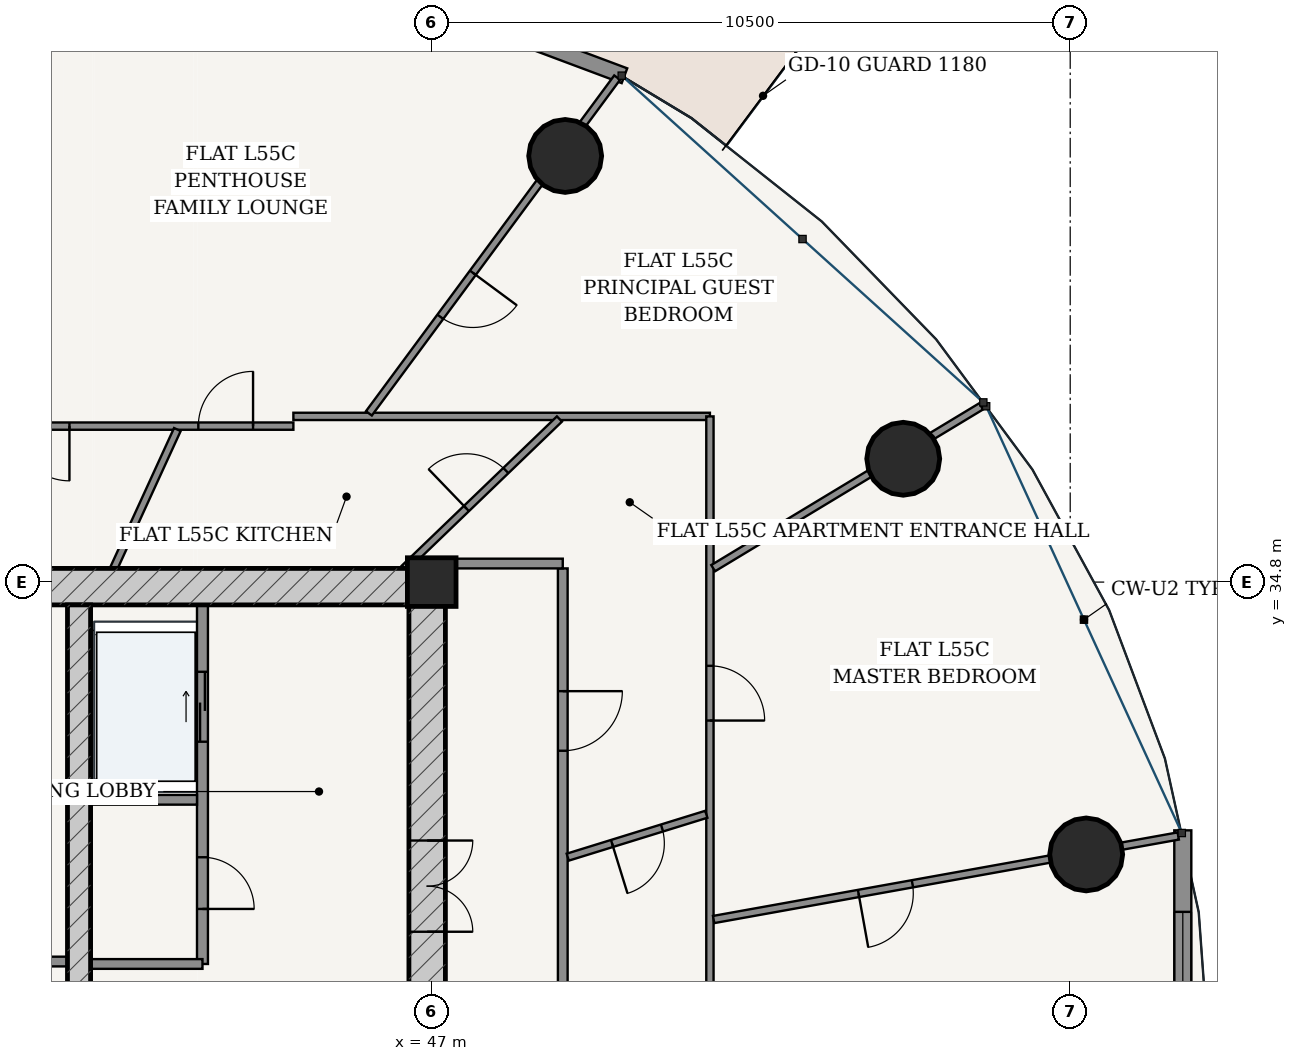
"""IFC4 building model, lengths in metres.
Left out: names, types, materials, properties, quantities, classifications, styles, units other than length and angle.
Written with IfcOpenShell. Run it as: python <this file> out.ifc"""

import sys

from ifc_helpers import new_model, si_unit, direction, frame, frame_2d, origin, origin_2d, place, context, subcontext, project, spatial, rectangle, hollow_circle, extrude, source, transform, mapped, element, fill, save


model = new_model("IFC4")
c1 = context("Model", 3, precision=1e-05, world=origin(), true_north=direction((-0.2419218956, 0.970295726276)))
c2 = subcontext(c1, "Body", "Model", "MODEL_VIEW")
j1 = project(units=[si_unit("LENGTHUNIT", "METRE"), si_unit("PLANEANGLEUNIT", "RADIAN")], contexts=[c1])
p1 = place(None, origin())
s1 = spatial("IfcSite", under=j1, at=p1, CompositionType="ELEMENT")
p2 = place(p1, origin())
s2 = spatial("IfcBuilding", under=s1, at=p2, CompositionType="ELEMENT")
p3 = place(p2, frame((0.0, 0.0, 209.7)))
s3 = spatial("IfcBuildingStorey", under=s2, at=p3, CompositionType="ELEMENT", Elevation=209.7)
p4 = place(p3, frame((47.0, 34.8, 0.0), z_axis=(0.0, 0.0, 1.0), x_axis=(1.0, 0.0, 0.0)))
e1 = element("IfcColumn", 1, at=p4, inside=s3, PredefinedType="COLUMN", context=c2, shape_type="SweptSolid", body=[
    extrude(rectangle(XDim=0.8, YDim=0.8, at=origin_2d()), origin(), (0.0, 0.0, 1.0), 3.7),
])
p5 = place(p3, frame((28.775, 34.725, 0.0), z_axis=(0.0, 0.0, 1.0), x_axis=(1.0, 0.0, 0.0)))
e2 = element("IfcWall", 2, at=p5, inside=s3, PredefinedType="SHEAR", context=c2, shape_type="SweptSolid", body=[
    extrude(rectangle(XDim=18.45, YDim=0.6, at=frame_2d((9.225, 0.0))), origin(), (0.0, 0.0, 1.0), 3.435),
])
p6 = place(p3, frame((46.925, 19.175, 0.0), z_axis=(0.0, 0.0, 1.0), x_axis=(0.0, 1.0, 0.0)))
e3 = element("IfcWall", 3, at=p6, inside=s3, PredefinedType="SHEAR", context=c2, shape_type="SweptSolid", body=[
    extrude(rectangle(XDim=15.25, YDim=0.6, at=frame_2d((7.625, 0.0))), origin(), (0.0, 0.0, 1.0), 3.435),
])
p7 = place(p6, frame((9.875, 0.0, 0.0)))
e4 = element("IfcOpeningElement", 4, at=p7, cuts=e3, PredefinedType="OPENING", context=c2, shape_type="SweptSolid", body=[
    extrude(rectangle(XDim=1.5, YDim=2.2, at=frame_2d((0.75, 1.1))), frame((0.0, 0.31, 0.0), z_axis=(0.0, -1.0, 0.0), x_axis=(1.0, 0.0, 0.0)), (0.0, 0.0, 1.0), 0.62),
])
p8 = place(p3, frame((41.2, 19.175, 0.0), z_axis=(0.0, 0.0, 1.0), x_axis=(0.0, 1.0, 0.0)))
e5 = element("IfcWall", 5, at=p8, inside=s3, PredefinedType="SHEAR", context=c2, shape_type="SweptSolid", body=[
    extrude(rectangle(XDim=15.25, YDim=0.38, at=frame_2d((7.625, 0.0))), origin(), (0.0, 0.0, 1.0), 3.435),
])
p9 = place(p8, frame((7.8, 0.0, 0.0)))
e6 = element("IfcOpeningElement", 6, at=p9, cuts=e5, PredefinedType="OPENING", context=c2, shape_type="SweptSolid", body=[
    extrude(rectangle(XDim=1.05, YDim=2.15, at=frame_2d((0.525, 1.075))), frame((0.0, 0.2, 0.0), z_axis=(0.0, -1.0, 0.0), x_axis=(1.0, 0.0, 0.0)), (0.0, 0.0, 1.0), 0.4),
])
for number, where, z_axis, x_axis in (
    (7, (57.763, 30.321, 0.0), (0.0, 0.0, 1.0), (1.0, 0.0, 0.0)),
    (8, (54.754, 36.828, 0.0), (0.0, 0.0, 1.0), (1.0, 0.0, 0.0)),
    (9, (49.195, 41.808, 0.0), (0.0, 0.0, 1.0), (1.0, 0.0, 0.0)),
):
    element("IfcColumn", number, at=place(p3, frame(where, z_axis=z_axis, x_axis=x_axis)), inside=s3, PredefinedType="COLUMN", context=c2, shape_type="SweptSolid", body=[
        extrude(hollow_circle(Radius=0.6, WallThickness=0.038, at=origin_2d()), origin(), (0.0, 0.0, 1.0), 3.7),
    ])
p10 = place(p3, frame((50.17, 43.127, 0.0), z_axis=(0.0, 0.0, 1.0), x_axis=(-0.936556918375, 0.350515532672, 0.0)))
e10 = element("IfcWall", 10, at=p10, inside=s3, PredefinedType="SOLIDWALL", context=c2, shape_type="SweptSolid", body=[
    extrude(rectangle(XDim=8.539, YDim=0.26, at=frame_2d((4.27, 0.0))), origin(), (0.0, 0.0, 1.0), 3.435),
])
p11 = place(p10, frame((3.594, 0.0, 0.0)))
e11 = element("IfcOpeningElement", 11, at=p11, cuts=e10, PredefinedType="OPENING", context=c2, shape_type="SweptSolid", body=[
    extrude(rectangle(XDim=1.35, YDim=2.2, at=frame_2d((0.675, 1.1))), frame((0.0, 0.14, 0.0), z_axis=(0.0, -1.0, 0.0), x_axis=(1.0, 0.0, 0.0)), (0.0, 0.0, 1.0), 0.28),
])
p12 = place(p3, frame((59.352, 22.883, 0.0), z_axis=(0.0, 0.0, 1.0), x_axis=(0.0, 1.0, 0.0)))
e12 = element("IfcWall", 12, at=p12, inside=s3, PredefinedType="SOLIDWALL", context=c2, shape_type="SweptSolid", body=[
    extrude(rectangle(XDim=7.835, YDim=0.28, at=frame_2d((3.917, 0.0))), origin(), (0.0, 0.0, 1.0), 3.435),
])
p13 = place(p12, frame((1.34, 0.0, 0.85)))
e13 = element("IfcOpeningElement", 13, at=p13, cuts=e12, PredefinedType="OPENING", context=c2, shape_type="SweptSolid", body=[
    extrude(rectangle(XDim=1.55, YDim=1.95, at=frame_2d((0.775, 0.975))), frame((0.0, 0.15, 0.0), z_axis=(0.0, -1.0, 0.0), x_axis=(1.0, 0.0, 0.0)), (0.0, 0.0, 1.0), 0.3),
])
p14 = place(p12, frame((4.944, 0.0, 0.85)))
e14 = element("IfcOpeningElement", 14, at=p14, cuts=e12, PredefinedType="OPENING", context=c2, shape_type="SweptSolid", body=[
    extrude(rectangle(XDim=1.55, YDim=1.95, at=frame_2d((0.775, 0.975))), frame((0.0, 0.15, 0.0), z_axis=(0.0, -1.0, 0.0), x_axis=(1.0, 0.0, 0.0)), (0.0, 0.0, 1.0), 0.3),
])
p15 = place(p3, frame((43.23, 28.52, 0.0), z_axis=(0.0, 0.0, 1.0), x_axis=(0.0, 1.0, 0.0)))
e15 = element("IfcWall", 15, at=p15, inside=s3, PredefinedType="PARTITIONING", context=c2, shape_type="SweptSolid", body=[
    extrude(rectangle(XDim=5.905, YDim=0.18, at=frame_2d((2.953, 0.0))), origin(), (0.0, 0.0, 1.0), 3.435),
])
p16 = place(p15, frame((0.905, 0.0, 0.0)))
e16 = element("IfcOpeningElement", 16, at=p16, cuts=e15, PredefinedType="OPENING", context=c2, shape_type="SweptSolid", body=[
    extrude(rectangle(XDim=0.85, YDim=2.1, at=frame_2d((0.425, 1.05))), frame((0.0, 0.1, 0.0), z_axis=(0.0, -1.0, 0.0), x_axis=(1.0, 0.0, 0.0)), (0.0, 0.0, 1.0), 0.2),
])
p17 = place(p15, frame((3.655, 0.0, 0.0)))
e17 = element("IfcOpeningElement", 17, at=p17, cuts=e15, PredefinedType="OPENING", context=c2, shape_type="SweptSolid", body=[
    extrude(rectangle(XDim=1.15, YDim=2.2, at=frame_2d((0.575, 1.1))), frame((0.0, 0.1, 0.0), z_axis=(0.0, -1.0, 0.0), x_axis=(1.0, 0.0, 0.0)), (0.0, 0.0, 1.0), 0.2),
])
p18 = place(p3, frame((41.39, 31.22, 0.0), z_axis=(0.0, 0.0, 1.0), x_axis=(1.0, 0.0, 0.0)))
e18 = element("IfcWall", 18, at=p18, inside=s3, PredefinedType="PARTITIONING", context=c2, shape_type="SweptSolid", body=[
    extrude(rectangle(XDim=1.75, YDim=0.16, at=frame_2d((0.875, 0.0))), origin(), (0.0, 0.0, 1.0), 3.435),
])
p19 = place(p3, frame((41.39, 28.52, 0.0), z_axis=(0.0, 0.0, 1.0), x_axis=(1.0, 0.0, 0.0)))
e19 = element("IfcWall", 19, at=p19, inside=s3, PredefinedType="PARTITIONING", context=c2, shape_type="SweptSolid", body=[
    extrude(rectangle(XDim=1.84, YDim=0.16, at=frame_2d((0.92, 0.0))), origin(), (0.0, 0.0, 1.0), 3.435),
])
p20 = place(p3, frame((34.99, 28.56, 0.0), z_axis=(0.0, 0.0, 1.0), x_axis=(1.0, 0.0, 0.0)))
e20 = element("IfcWall", 20, at=p20, inside=s3, PredefinedType="PARTITIONING", context=c2, shape_type="SweptSolid", body=[
    extrude(rectangle(XDim=6.02, YDim=0.16, at=frame_2d((3.01, 0.0))), origin(), (0.0, 0.0, 1.0), 3.435),
])
p21 = place(p20, frame((1.025, 0.0, 0.0)))
e21 = element("IfcOpeningElement", 21, at=p21, cuts=e20, PredefinedType="OPENING", context=c2, shape_type="SweptSolid", body=[
    extrude(rectangle(XDim=0.86, YDim=2.1, at=frame_2d((0.43, 1.05))), frame((0.0, 0.09, 0.0), z_axis=(0.0, -1.0, 0.0), x_axis=(1.0, 0.0, 0.0)), (0.0, 0.0, 1.0), 0.18),
])
p22 = place(p20, frame((4.14, 0.0, 0.0)))
e22 = element("IfcOpeningElement", 22, at=p22, cuts=e20, PredefinedType="OPENING", context=c2, shape_type="SweptSolid", body=[
    extrude(rectangle(XDim=0.85, YDim=2.1, at=frame_2d((0.425, 1.05))), frame((0.0, 0.09, 0.0), z_axis=(0.0, -1.0, 0.0), x_axis=(1.0, 0.0, 0.0)), (0.0, 0.0, 1.0), 0.18),
])
p23 = place(p3, frame((49.155, 16.725, 0.0), z_axis=(0.0, 0.0, 1.0), x_axis=(0.0, 1.0, 0.0)))
e23 = element("IfcWall", 23, at=p23, inside=s3, PredefinedType="PARTITIONING", context=c2, shape_type="SweptSolid", body=[
    extrude(rectangle(XDim=18.3, YDim=0.16, at=frame_2d((9.15, 0.0))), origin(), (0.0, 0.0, 1.0), 2.951),
])
p24 = place(p23, frame((15.302, 0.0, 0.0)))
e24 = element("IfcOpeningElement", 24, at=p24, cuts=e23, PredefinedType="OPENING", context=c2, shape_type="SweptSolid", body=[
    extrude(rectangle(XDim=0.98, YDim=2.2, at=frame_2d((0.49, 1.1))), frame((0.0, 0.09, 0.0), z_axis=(0.0, -1.0, 0.0), x_axis=(1.0, 0.0, 0.0)), (0.0, 0.0, 1.0), 0.18),
])
p25 = place(p3, frame((47.225, 35.105, 0.0), z_axis=(0.0, 0.0, 1.0), x_axis=(1.0, 0.0, 0.0)))
e25 = element("IfcWall", 25, at=p25, inside=s3, PredefinedType="PARTITIONING", context=c2, shape_type="SweptSolid", body=[
    extrude(rectangle(XDim=1.93, YDim=0.16, at=frame_2d((0.965, 0.0))), origin(), (0.0, 0.0, 1.0), 3.435),
])
p26 = place(p3, frame((38.102, 37.365, 0.0), z_axis=(0.0, 0.0, 1.0), x_axis=(1.0, 0.0, 0.0)))
e26 = element("IfcWall", 26, at=p26, inside=s3, PredefinedType="PARTITIONING", context=c2, shape_type="SweptSolid", body=[
    extrude(rectangle(XDim=6.623, YDim=0.12, at=frame_2d((3.312, 0.0))), origin(), (0.0, 0.0, 1.0), 2.951),
])
p27 = place(p26, frame((5.06, 0.0, 0.0)))
e27 = element("IfcOpeningElement", 27, at=p27, cuts=e26, PredefinedType="OPENING", context=c2, shape_type="SweptSolid", body=[
    extrude(rectangle(XDim=0.9, YDim=2.15, at=frame_2d((0.45, 1.075))), frame((0.0, 0.07, 0.0), z_axis=(0.0, -1.0, 0.0), x_axis=(1.0, 0.0, 0.0)), (0.0, 0.0, 1.0), 0.14),
])
p28 = place(p26, frame((2.04, 0.0, 0.0)))
e28 = element("IfcOpeningElement", 28, at=p28, cuts=e26, PredefinedType="OPENING", context=c2, shape_type="SweptSolid", body=[
    extrude(rectangle(XDim=0.9, YDim=2.15, at=frame_2d((0.45, 1.075))), frame((0.0, 0.07, 0.0), z_axis=(0.0, -1.0, 0.0), x_axis=(1.0, 0.0, 0.0)), (0.0, 0.0, 1.0), 0.14),
])
p29 = place(p3, frame((44.725, 37.525, 0.0), z_axis=(0.0, 0.0, 1.0), x_axis=(1.0, 0.0, 0.0)))
e29 = element("IfcWall", 29, at=p29, inside=s3, PredefinedType="PARTITIONING", context=c2, shape_type="SweptSolid", body=[
    extrude(rectangle(XDim=6.85, YDim=0.12, at=frame_2d((3.425, 0.0))), origin(), (0.0, 0.0, 1.0), 2.951),
])
p30 = place(p3, frame((51.575, 37.525, 0.0), z_axis=(0.0, 0.0, 1.0), x_axis=(0.0, -1.0, 0.0)))
e30 = element("IfcWall", 30, at=p30, inside=s3, PredefinedType="PARTITIONING", context=c2, shape_type="SweptSolid", body=[
    extrude(rectangle(XDim=22.89, YDim=0.12, at=frame_2d((11.445, 0.0))), origin(), (0.0, 0.0, 1.0), 2.951),
])
p31 = place(p30, frame((4.102, 0.0, 0.0)))
e31 = element("IfcOpeningElement", 31, at=p31, cuts=e30, PredefinedType="OPENING", context=c2, shape_type="SweptSolid", body=[
    extrude(rectangle(XDim=0.9, YDim=2.15, at=frame_2d((0.45, 1.075))), frame((0.0, 0.07, 0.0), z_axis=(0.0, -1.0, 0.0), x_axis=(1.0, 0.0, 0.0)), (0.0, 0.0, 1.0), 0.14),
])
p32 = place(p30, frame((19.163, 0.0, 0.0)))
e32 = element("IfcOpeningElement", 32, at=p32, cuts=e30, PredefinedType="OPENING", context=c2, shape_type="SweptSolid", body=[
    extrude(rectangle(XDim=0.86, YDim=2.15, at=frame_2d((0.43, 1.075))), frame((0.0, 0.07, 0.0), z_axis=(0.0, -1.0, 0.0), x_axis=(1.0, 0.0, 0.0)), (0.0, 0.0, 1.0), 0.14),
])
p33 = place(p30, frame((13.046, 0.0, 0.0)))
e33 = element("IfcOpeningElement", 33, at=p33, cuts=e30, PredefinedType="OPENING", context=c2, shape_type="SweptSolid", body=[
    extrude(rectangle(XDim=0.9, YDim=2.15, at=frame_2d((0.45, 1.075))), frame((0.0, 0.07, 0.0), z_axis=(0.0, -1.0, 0.0), x_axis=(1.0, 0.0, 0.0)), (0.0, 0.0, 1.0), 0.14),
])
p34 = place(p3, frame((51.636, 29.251, 0.0), z_axis=(0.0, 0.0, 1.0), x_axis=(0.984223216243, 0.176931231294, 0.0)))
e34 = element("IfcWall", 34, at=p34, inside=s3, PredefinedType="PARTITIONING", context=c2, shape_type="SweptSolid", body=[
    extrude(rectangle(XDim=7.763, YDim=0.12, at=frame_2d((3.882, 0.0))), origin(), (0.0, 0.0, 1.0), 2.951),
])
p35 = place(p34, frame((2.421, 0.0, 0.0)))
e35 = element("IfcOpeningElement", 35, at=p35, cuts=e34, PredefinedType="OPENING", context=c2, shape_type="SweptSolid", body=[
    extrude(rectangle(XDim=0.9, YDim=2.15, at=frame_2d((0.45, 1.075))), frame((0.0, 0.07, 0.0), z_axis=(0.0, -1.0, 0.0), x_axis=(1.0, 0.0, 0.0)), (0.0, 0.0, 1.0), 0.14),
])
p36 = place(p3, frame((51.628, 35.029, 0.0), z_axis=(0.0, 0.0, 1.0), x_axis=(0.856041879651, 0.516906471505, 0.0)))
e36 = element("IfcWall", 36, at=p36, inside=s3, PredefinedType="PARTITIONING", context=c2, shape_type="SweptSolid", body=[
    extrude(rectangle(XDim=5.149, YDim=0.12, at=frame_2d((2.574, 0.0))), origin(), (0.0, 0.0, 1.0), 2.951),
])
p37 = place(p3, frame((45.967, 37.575, 0.0), z_axis=(0.0, 0.0, 1.0), x_axis=(0.59452500855, 0.804077119565, 0.0)))
e37 = element("IfcWall", 37, at=p37, inside=s3, PredefinedType="PARTITIONING", context=c2, shape_type="SweptSolid", body=[
    extrude(rectangle(XDim=6.867, YDim=0.12, at=frame_2d((3.434, 0.0))), origin(), (0.0, 0.0, 1.0), 2.951),
])
p38 = place(p37, frame((1.975, 0.0, 0.0)))
e38 = element("IfcOpeningElement", 38, at=p38, cuts=e37, PredefinedType="OPENING", context=c2, shape_type="SweptSolid", body=[
    extrude(rectangle(XDim=0.9, YDim=2.15, at=frame_2d((0.45, 1.075))), frame((0.0, 0.07, 0.0), z_axis=(0.0, -1.0, 0.0), x_axis=(1.0, 0.0, 0.0)), (0.0, 0.0, 1.0), 0.14),
])
p39 = place(p3, frame((49.237, 30.277, 0.0), z_axis=(0.0, 0.0, 1.0), x_axis=(0.955326488692, 0.295552533406, 0.0)))
e39 = element("IfcWall", 39, at=p39, inside=s3, PredefinedType="PARTITIONING", context=c2, shape_type="SweptSolid", body=[
    extrude(rectangle(XDim=2.386, YDim=0.12, at=frame_2d((1.193, 0.0))), origin(), (0.0, 0.0, 1.0), 3.435),
])
p40 = place(p39, frame((0.763, 0.0, 0.0)))
e40 = element("IfcOpeningElement", 40, at=p40, cuts=e39, PredefinedType="OPENING", context=c2, shape_type="SweptSolid", body=[
    extrude(rectangle(XDim=0.86, YDim=2.15, at=frame_2d((0.43, 1.075))), frame((0.0, 0.07, 0.0), z_axis=(0.0, -1.0, 0.0), x_axis=(1.0, 0.0, 0.0)), (0.0, 0.0, 1.0), 0.14),
])
p41 = place(p3, frame((46.549, 35.026, 0.0), z_axis=(0.0, 0.0, 1.0), x_axis=(0.720557461206, 0.693395230082, 0.0)))
e41 = element("IfcWall", 41, at=p41, inside=s3, PredefinedType="PARTITIONING", context=c2, shape_type="SweptSolid", body=[
    extrude(rectangle(XDim=3.541, YDim=0.12, at=frame_2d((1.771, 0.0))), origin(), (0.0, 0.0, 1.0), 2.951),
])
p42 = place(p41, frame((1.419, 0.0, 0.0)))
e42 = element("IfcOpeningElement", 42, at=p42, cuts=e41, PredefinedType="OPENING", context=c2, shape_type="SweptSolid", body=[
    extrude(rectangle(XDim=0.9, YDim=2.15, at=frame_2d((0.45, 1.075))), frame((0.0, 0.07, 0.0), z_axis=(0.0, -1.0, 0.0), x_axis=(1.0, 0.0, 0.0)), (0.0, 0.0, 1.0), 0.14),
])
p43 = place(p3, frame((41.771, 35.027, 0.0), z_axis=(0.0, 0.0, 1.0), x_axis=(0.416688202143, 0.909049471808, 0.0)))
e43 = element("IfcWall", 43, at=p43, inside=s3, PredefinedType="PARTITIONING", context=c2, shape_type="SweptSolid", body=[
    extrude(rectangle(XDim=2.51, YDim=0.12, at=frame_2d((1.255, 0.0))), origin(), (0.0, 0.0, 1.0), 3.435),
])
m1 = source(origin(), c2, "Body", "SweptSolid", [
    extrude(rectangle(XDim=1.55, YDim=1.95, at=frame_2d((0.775, 0.975))), frame((0.0, 0.03, 0.0), z_axis=(0.0, -1.0, 0.0), x_axis=(1.0, 0.0, 0.0)), (0.0, 0.0, 1.0), 0.06),
])
p44 = place(p14, origin())
e44 = element("IfcWindow", 44, at=p44, inside=s3, PartitioningType="SINGLE_PANEL", PredefinedType="WINDOW", context=c2, shape_type="MappedRepresentation", body=[
    mapped(m1, transform((0.0, 0.0, 0.0), scale=1.0)),
])
fill(e14, e44)
m2 = source(origin(), c2, "Body", "SweptSolid", [
    extrude(rectangle(XDim=1.5, YDim=2.2, at=frame_2d((0.75, 1.1))), frame((0.0, 0.025, 0.0), z_axis=(0.0, -1.0, 0.0), x_axis=(1.0, 0.0, 0.0)), (0.0, 0.0, 1.0), 0.05),
])
p45 = place(p7, frame((1.5, 0.0, 0.0), z_axis=(0.0, 0.0, 1.0), x_axis=(-1.0, 0.0, 0.0)))
e45 = element("IfcDoor", 45, at=p45, inside=s3, OperationType="DOUBLE_DOOR_SINGLE_SWING", PredefinedType="DOOR", context=c2, shape_type="MappedRepresentation", body=[
    mapped(m2, transform((0.0, 0.0, 0.0), scale=1.0)),
])
fill(e4, e45)
m3 = source(origin(), c2, "Body", "SweptSolid", [
    extrude(rectangle(XDim=0.85, YDim=2.1, at=frame_2d((0.425, 1.05))), frame((0.0, 0.025, 0.0), z_axis=(0.0, -1.0, 0.0), x_axis=(1.0, 0.0, 0.0)), (0.0, 0.0, 1.0), 0.05),
])
p46 = place(p16, frame((0.85, 0.0, 0.0), z_axis=(0.0, 0.0, 1.0), x_axis=(-1.0, 0.0, 0.0)))
e46 = element("IfcDoor", 46, at=p46, inside=s3, OperationType="SINGLE_SWING_RIGHT", PredefinedType="DOOR", context=c2, shape_type="MappedRepresentation", body=[
    mapped(m3, transform((0.0, 0.0, 0.0), scale=1.0)),
])
fill(e16, e46)
m4 = source(origin(), c2, "Body", "SweptSolid", [
    extrude(rectangle(XDim=1.15, YDim=2.2, at=frame_2d((0.575, 1.1))), frame((0.0, 0.025, 0.0), z_axis=(0.0, -1.0, 0.0), x_axis=(1.0, 0.0, 0.0)), (0.0, 0.0, 1.0), 0.05),
])
p47 = place(p17, origin())
e47 = element("IfcDoor", 47, at=p47, inside=s3, OperationType="DOUBLE_DOOR_SLIDING", PredefinedType="DOOR", context=c2, shape_type="MappedRepresentation", body=[
    mapped(m4, transform((0.0, 0.0, 0.0), scale=1.0)),
])
fill(e17, e47)
m5 = source(origin(), c2, "Body", "SweptSolid", [
    extrude(rectangle(XDim=0.98, YDim=2.2, at=frame_2d((0.49, 1.1))), frame((0.0, 0.025, 0.0), z_axis=(0.0, -1.0, 0.0), x_axis=(1.0, 0.0, 0.0)), (0.0, 0.0, 1.0), 0.05),
])
p48 = place(p24, frame((0.98, 0.0, 0.0), z_axis=(0.0, 0.0, 1.0), x_axis=(-1.0, 0.0, 0.0)))
e48 = element("IfcDoor", 48, at=p48, inside=s3, OperationType="SINGLE_SWING_LEFT", PredefinedType="DOOR", context=c2, shape_type="MappedRepresentation", body=[
    mapped(m5, transform((0.0, 0.0, 0.0), scale=1.0)),
])
fill(e24, e48)
m6 = source(origin(), c2, "Body", "SweptSolid", [
    extrude(rectangle(XDim=0.86, YDim=2.15, at=frame_2d((0.43, 1.075))), frame((0.0, 0.025, 0.0), z_axis=(0.0, -1.0, 0.0), x_axis=(1.0, 0.0, 0.0)), (0.0, 0.0, 1.0), 0.05),
])
p49 = place(p40, frame((0.86, 0.0, 0.0), z_axis=(0.0, 0.0, 1.0), x_axis=(-1.0, 0.0, 0.0)))
e49 = element("IfcDoor", 49, at=p49, inside=s3, OperationType="SINGLE_SWING_RIGHT", PredefinedType="DOOR", context=c2, shape_type="MappedRepresentation", body=[
    mapped(m6, transform((0.0, 0.0, 0.0), scale=1.0)),
])
fill(e40, e49)
m7 = source(origin(), c2, "Body", "SweptSolid", [
    extrude(rectangle(XDim=0.9, YDim=2.15, at=frame_2d((0.45, 1.075))), frame((0.0, 0.025, 0.0), z_axis=(0.0, -1.0, 0.0), x_axis=(1.0, 0.0, 0.0)), (0.0, 0.0, 1.0), 0.05),
])
p50 = place(p42, origin())
e50 = element("IfcDoor", 50, at=p50, inside=s3, OperationType="SINGLE_SWING_LEFT", PredefinedType="DOOR", context=c2, shape_type="MappedRepresentation", body=[
    mapped(m7, transform((0.0, 0.0, 0.0), scale=1.0)),
])
fill(e42, e50)
p51 = place(p27, origin())
e51 = element("IfcDoor", 51, at=p51, inside=s3, OperationType="SINGLE_SWING_RIGHT", PredefinedType="DOOR", context=c2, shape_type="MappedRepresentation", body=[
    mapped(m7, transform((0.0, 0.0, 0.0), scale=1.0)),
])
fill(e27, e51)
p52 = place(p28, frame((0.9, 0.0, 0.0), z_axis=(0.0, 0.0, 1.0), x_axis=(-1.0, 0.0, 0.0)))
e52 = element("IfcDoor", 52, at=p52, inside=s3, OperationType="SINGLE_SWING_LEFT", PredefinedType="DOOR", context=c2, shape_type="MappedRepresentation", body=[
    mapped(m7, transform((0.0, 0.0, 0.0), scale=1.0)),
])
fill(e28, e52)
p53 = place(p31, origin())
e53 = element("IfcDoor", 53, at=p53, inside=s3, OperationType="SINGLE_SWING_RIGHT", PredefinedType="DOOR", context=c2, shape_type="MappedRepresentation", body=[
    mapped(m7, transform((0.0, 0.0, 0.0), scale=1.0)),
])
fill(e31, e53)
p54 = place(p38, frame((0.9, 0.0, 0.0), z_axis=(0.0, 0.0, 1.0), x_axis=(-1.0, 0.0, 0.0)))
e54 = element("IfcDoor", 54, at=p54, inside=s3, OperationType="SINGLE_SWING_LEFT", PredefinedType="DOOR", context=c2, shape_type="MappedRepresentation", body=[
    mapped(m7, transform((0.0, 0.0, 0.0), scale=1.0)),
])
fill(e38, e54)
p55 = place(p35, frame((0.9, 0.0, 0.0), z_axis=(0.0, 0.0, 1.0), x_axis=(-1.0, 0.0, 0.0)))
e55 = element("IfcDoor", 55, at=p55, inside=s3, OperationType="SINGLE_SWING_RIGHT", PredefinedType="DOOR", context=c2, shape_type="MappedRepresentation", body=[
    mapped(m7, transform((0.0, 0.0, 0.0), scale=1.0)),
])
fill(e35, e55)
save(model, sys.argv[1])
